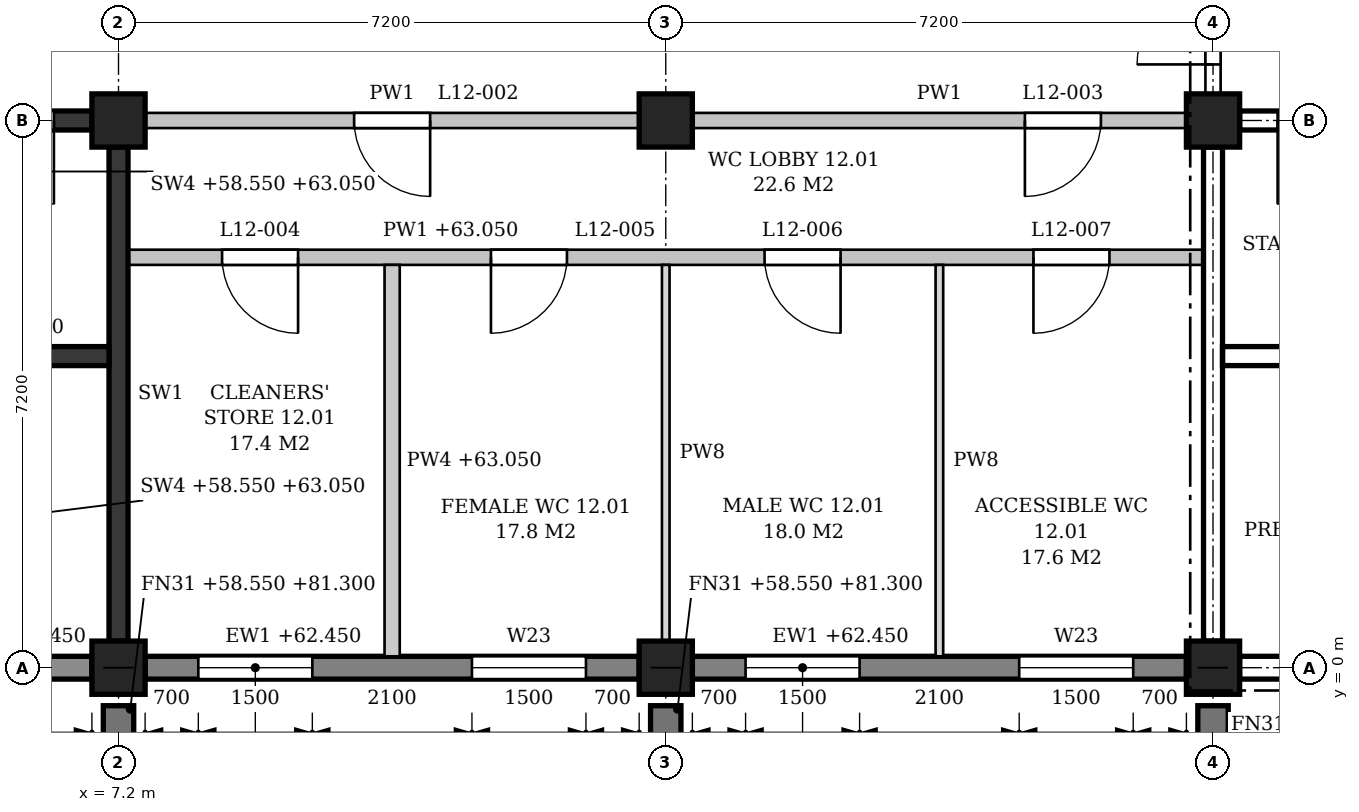
"""IFC4 building model, lengths in metres.
Left out: names, types, materials, properties, quantities, classifications, styles, units other than length and angle.
Written with IfcOpenShell. Run it as: python <this file> out.ifc"""

import sys

from ifc_helpers import new_model, si_unit, direction, frame, frame_2d, origin, origin_2d, place, context, subcontext, project, spatial, polyline, rectangle, outline, extrude, element, fill, save


model = new_model("IFC4")
c1 = context("Model", 3, precision=1e-05, world=origin(), true_north=direction((0.0, 1.0)))
c2 = subcontext(c1, "Body", "Model", "MODEL_VIEW")
j1 = project(units=[si_unit("LENGTHUNIT", "METRE"), si_unit("PLANEANGLEUNIT", "RADIAN")], contexts=[c1])
p1 = place(None, origin())
s1 = spatial("IfcSite", under=j1, at=p1, CompositionType="ELEMENT")
p2 = place(p1, origin())
s2 = spatial("IfcBuilding", under=s1, at=p2, CompositionType="ELEMENT")
p3 = place(p2, frame((0.0, 0.0, 58.8)))
s3 = spatial("IfcBuildingStorey", under=s2, at=p3, CompositionType="ELEMENT", Elevation=58.8)
for number, where, z_axis, x_axis in (
    (1, (7.2, 0.0, 0.0), (0.0, 0.0, 1.0), (1.0, 0.0, 0.0)),
    (2, (7.2, 7.2, 0.0), (0.0, 0.0, 1.0), (1.0, 0.0, 0.0)),
    (3, (14.4, 0.0, 0.0), (0.0, 0.0, 1.0), (1.0, 0.0, 0.0)),
    (4, (14.4, 7.2, 0.0), (0.0, 0.0, 1.0), (1.0, 0.0, 0.0)),
    (5, (21.6, 0.0, 0.0), (0.0, 0.0, 1.0), (1.0, 0.0, 0.0)),
    (6, (21.6, 7.2, 0.0), (0.0, 0.0, 1.0), (1.0, 0.0, 0.0)),
):
    element("IfcColumn", number, at=place(p3, frame(where, z_axis=z_axis, x_axis=x_axis)), inside=s3, PredefinedType="COLUMN", context=c2, shape_type="SweptSolid", body=[
        extrude(rectangle(XDim=0.7, YDim=0.7, at=origin_2d()), origin(), (0.0, 0.0, 1.0), 4.5),
    ])
p4 = place(p3, frame((0.35, 0.0, 0.0), z_axis=(0.0, 0.0, 1.0), x_axis=(1.0, 0.0, 0.0)))
e7 = element("IfcWall", 7, at=p4, inside=s3, PredefinedType="STANDARD", context=c2, shape_type="SweptSolid", body=[
    extrude(rectangle(XDim=6.5, YDim=0.3, at=frame_2d((3.25, 0.0))), origin(), (0.0, 0.0, 1.0), 3.65),
])
p5 = place(p4, frame((1.0, 0.0, 0.9)))
e8 = element("IfcOpeningElement", 8, at=p5, cuts=e7, PredefinedType="OPENING", context=c2, shape_type="SweptSolid", body=[
    extrude(outline(polyline([(0.0, 0.0), (0.9, 0.0), (0.9, 2.25), (0.45, 2.7), (0.0, 2.25), (0.0, 0.0)])), frame((0.0, 0.16, 0.0), z_axis=(0.0, -1.0, 0.0), x_axis=(1.0, 0.0, 0.0)), (0.0, 0.0, 1.0), 0.32),
])
p6 = place(p3, frame((7.55, 0.0, 0.0), z_axis=(0.0, 0.0, 1.0), x_axis=(1.0, 0.0, 0.0)))
e9 = element("IfcWall", 9, at=p6, inside=s3, PredefinedType="STANDARD", context=c2, shape_type="SweptSolid", body=[
    extrude(rectangle(XDim=6.5, YDim=0.3, at=frame_2d((3.25, 0.0))), origin(), (0.0, 0.0, 1.0), 3.65),
])
p7 = place(p6, frame((0.7, 0.0, 0.9)))
e10 = element("IfcOpeningElement", 10, at=p7, cuts=e9, PredefinedType="OPENING", context=c2, shape_type="SweptSolid", body=[
    extrude(outline(polyline([(0.0, 0.0), (1.5, 0.0), (1.5, 1.95), (0.75, 2.7), (0.0, 1.95), (0.0, 0.0)])), frame((0.0, 0.16, 0.0), z_axis=(0.0, -1.0, 0.0), x_axis=(1.0, 0.0, 0.0)), (0.0, 0.0, 1.0), 0.32),
])
p8 = place(p6, frame((4.3, 0.0, 0.9)))
e11 = element("IfcOpeningElement", 11, at=p8, cuts=e9, PredefinedType="OPENING", context=c2, shape_type="SweptSolid", body=[
    extrude(outline(polyline([(0.0, 0.0), (1.5, 0.0), (1.5, 1.95), (0.75, 2.7), (0.0, 1.95), (0.0, 0.0)])), frame((0.0, 0.16, 0.0), z_axis=(0.0, -1.0, 0.0), x_axis=(1.0, 0.0, 0.0)), (0.0, 0.0, 1.0), 0.32),
])
p9 = place(p3, frame((14.75, 0.0, 0.0), z_axis=(0.0, 0.0, 1.0), x_axis=(1.0, 0.0, 0.0)))
e12 = element("IfcWall", 12, at=p9, inside=s3, PredefinedType="STANDARD", context=c2, shape_type="SweptSolid", body=[
    extrude(rectangle(XDim=6.5, YDim=0.3, at=frame_2d((3.25, 0.0))), origin(), (0.0, 0.0, 1.0), 3.65),
])
p10 = place(p9, frame((0.7, 0.0, 0.9)))
e13 = element("IfcOpeningElement", 13, at=p10, cuts=e12, PredefinedType="OPENING", context=c2, shape_type="SweptSolid", body=[
    extrude(outline(polyline([(0.0, 0.0), (1.5, 0.0), (1.5, 1.95), (0.75, 2.7), (0.0, 1.95), (0.0, 0.0)])), frame((0.0, 0.16, 0.0), z_axis=(0.0, -1.0, 0.0), x_axis=(1.0, 0.0, 0.0)), (0.0, 0.0, 1.0), 0.32),
])
p11 = place(p9, frame((4.3, 0.0, 0.9)))
e14 = element("IfcOpeningElement", 14, at=p11, cuts=e12, PredefinedType="OPENING", context=c2, shape_type="SweptSolid", body=[
    extrude(outline(polyline([(0.0, 0.0), (1.5, 0.0), (1.5, 1.95), (0.75, 2.7), (0.0, 1.95), (0.0, 0.0)])), frame((0.0, 0.16, 0.0), z_axis=(0.0, -1.0, 0.0), x_axis=(1.0, 0.0, 0.0)), (0.0, 0.0, 1.0), 0.32),
])
p12 = place(p3, frame((21.95, 0.0, 0.0), z_axis=(0.0, 0.0, 1.0), x_axis=(1.0, 0.0, 0.0)))
e15 = element("IfcWall", 15, at=p12, inside=s3, PredefinedType="STANDARD", context=c2, shape_type="SweptSolid", body=[
    extrude(rectangle(XDim=6.5, YDim=0.3, at=frame_2d((3.25, 0.0))), origin(), (0.0, 0.0, 1.0), 3.65),
])
p13 = place(p12, frame((4.6, 0.0, 0.9)))
e16 = element("IfcOpeningElement", 16, at=p13, cuts=e15, PredefinedType="OPENING", context=c2, shape_type="SweptSolid", body=[
    extrude(outline(polyline([(0.0, 0.0), (0.9, 0.0), (0.9, 2.25), (0.45, 2.7), (0.0, 2.25), (0.0, 0.0)])), frame((0.0, 0.16, 0.0), z_axis=(0.0, -1.0, 0.0), x_axis=(1.0, 0.0, 0.0)), (0.0, 0.0, 1.0), 0.32),
])
for number, where, z_axis, x_axis in (
    (17, (7.2, -0.5, -0.25), (0.0, 0.0, 1.0), (0.0, -1.0, 0.0)),
    (18, (14.4, -0.5, -0.25), (0.0, 0.0, 1.0), (0.0, -1.0, 0.0)),
    (19, (21.6, -0.5, -0.25), (0.0, 0.0, 1.0), (0.0, -1.0, 0.0)),
):
    element("IfcWall", number, at=place(p3, frame(where, z_axis=z_axis, x_axis=x_axis)), inside=s3, PredefinedType="POLYGONAL", context=c2, shape_type="SweptSolid", body=[
        extrude(outline(polyline([(0.5, 0.0), (0.5, 22.225), (0.15, 22.75), (0.0, 22.75), (0.0, 0.0), (0.5, 0.0)])), frame((0.0, 0.2, 0.0), z_axis=(0.0, -1.0, 0.0), x_axis=(1.0, 0.0, 0.0)), (0.0, 0.0, 1.0), 0.4),
    ])
p14 = place(p3, frame((0.35, 7.2, 0.0), z_axis=(0.0, 0.0, 1.0), x_axis=(1.0, 0.0, 0.0)))
e20 = element("IfcWall", 20, at=p14, inside=s3, PredefinedType="SHEAR", context=c2, shape_type="SweptSolid", body=[
    extrude(rectangle(XDim=6.5, YDim=0.25, at=frame_2d((3.25, 0.0))), origin(), (0.0, 0.0, 1.0), 3.6),
])
p15 = place(p14, frame((4.9, 0.0, 0.0)))
e21 = element("IfcOpeningElement", 21, at=p15, cuts=e20, PredefinedType="OPENING", context=c2, shape_type="SweptSolid", body=[
    extrude(rectangle(XDim=1.1, YDim=2.1, at=frame_2d((0.55, 1.05))), frame((0.0, 0.135, 0.0), z_axis=(0.0, -1.0, 0.0), x_axis=(1.0, 0.0, 0.0)), (0.0, 0.0, 1.0), 0.27),
])
p16 = place(p3, frame((7.2, 0.35, 0.0), z_axis=(0.0, 0.0, 1.0), x_axis=(0.0, 1.0, 0.0)))
e22 = element("IfcWall", 22, at=p16, inside=s3, PredefinedType="SHEAR", context=c2, shape_type="SweptSolid", body=[
    extrude(rectangle(XDim=6.5, YDim=0.25, at=frame_2d((3.25, 0.0))), origin(), (0.0, 0.0, 1.0), 3.6),
])
p17 = place(p3, frame((4.1, 4.1, 0.0), z_axis=(0.0, 0.0, 1.0), x_axis=(1.0, 0.0, 0.0)))
e23 = element("IfcWall", 23, at=p17, inside=s3, PredefinedType="SHEAR", context=c2, shape_type="SweptSolid", body=[
    extrude(rectangle(XDim=2.975, YDim=0.25, at=frame_2d((1.487, 0.0))), origin(), (0.0, 0.0, 1.0), 4.25),
])
p18 = place(p17, frame((0.55, 0.0, 0.0)))
e24 = element("IfcOpeningElement", 24, at=p18, cuts=e23, PredefinedType="OPENING", context=c2, shape_type="SweptSolid", body=[
    extrude(rectangle(XDim=0.9, YDim=2.1, at=frame_2d((0.45, 1.05))), frame((0.0, 0.135, 0.0), z_axis=(0.0, -1.0, 0.0), x_axis=(1.0, 0.0, 0.0)), (0.0, 0.0, 1.0), 0.27),
])
p19 = place(p3, frame((21.95, 7.2, 0.0), z_axis=(0.0, 0.0, 1.0), x_axis=(1.0, 0.0, 0.0)))
e25 = element("IfcWall", 25, at=p19, inside=s3, PredefinedType="SHEAR", context=c2, shape_type="SweptSolid", body=[
    extrude(rectangle(XDim=6.5, YDim=0.25, at=frame_2d((3.25, 0.0))), origin(), (0.0, 0.0, 1.0), 3.6),
])
p20 = place(p19, frame((0.5, 0.0, 0.0)))
e26 = element("IfcOpeningElement", 26, at=p20, cuts=e25, PredefinedType="OPENING", context=c2, shape_type="SweptSolid", body=[
    extrude(rectangle(XDim=1.1, YDim=2.1, at=frame_2d((0.55, 1.05))), frame((0.0, 0.135, 0.0), z_axis=(0.0, -1.0, 0.0), x_axis=(1.0, 0.0, 0.0)), (0.0, 0.0, 1.0), 0.27),
])
p21 = place(p3, frame((21.6, 0.35, 0.0), z_axis=(0.0, 0.0, 1.0), x_axis=(0.0, 1.0, 0.0)))
e27 = element("IfcWall", 27, at=p21, inside=s3, PredefinedType="SHEAR", context=c2, shape_type="SweptSolid", body=[
    extrude(rectangle(XDim=6.5, YDim=0.25, at=frame_2d((3.25, 0.0))), origin(), (0.0, 0.0, 1.0), 3.6),
])
p22 = place(p3, frame((21.725, 4.1, 0.0), z_axis=(0.0, 0.0, 1.0), x_axis=(1.0, 0.0, 0.0)))
e28 = element("IfcWall", 28, at=p22, inside=s3, PredefinedType="SHEAR", context=c2, shape_type="SweptSolid", body=[
    extrude(rectangle(XDim=2.975, YDim=0.25, at=frame_2d((1.487, 0.0))), origin(), (0.0, 0.0, 1.0), 4.25),
])
p23 = place(p22, frame((1.525, 0.0, 0.0)))
e29 = element("IfcOpeningElement", 29, at=p23, cuts=e28, PredefinedType="OPENING", context=c2, shape_type="SweptSolid", body=[
    extrude(rectangle(XDim=0.9, YDim=2.1, at=frame_2d((0.45, 1.05))), frame((0.0, 0.135, 0.0), z_axis=(0.0, -1.0, 0.0), x_axis=(1.0, 0.0, 0.0)), (0.0, 0.0, 1.0), 0.27),
])
p24 = place(p3, frame((7.325, 5.4, 0.0), z_axis=(0.0, 0.0, 1.0), x_axis=(1.0, 0.0, 0.0)))
e30 = element("IfcWall", 30, at=p24, inside=s3, PredefinedType="PARTITIONING", context=c2, shape_type="SweptSolid", body=[
    extrude(outline(polyline([(0.0, 0.0), (14.15, 0.0), (14.15, 3.6), (14.075, 3.6), (14.075, 4.25), (7.275, 4.25), (7.275, 3.6), (6.875, 3.6), (6.875, 4.25), (0.075, 4.25), (0.075, 3.6), (0.0, 3.6), (0.0, 0.0)])), frame((0.0, 0.1, 0.0), z_axis=(0.0, -1.0, 0.0), x_axis=(1.0, 0.0, 0.0)), (0.0, 0.0, 1.0), 0.2),
])
p25 = place(p24, frame((1.238, 0.0, 0.0)))
e31 = element("IfcOpeningElement", 31, at=p25, cuts=e30, PredefinedType="OPENING", context=c2, shape_type="SweptSolid", body=[
    extrude(rectangle(XDim=1.0, YDim=2.1, at=frame_2d((0.5, 1.05))), frame((0.0, 0.11, 0.0), z_axis=(0.0, -1.0, 0.0), x_axis=(1.0, 0.0, 0.0)), (0.0, 0.0, 1.0), 0.22),
])
p26 = place(p24, frame((4.775, 0.0, 0.0)))
e32 = element("IfcOpeningElement", 32, at=p26, cuts=e30, PredefinedType="OPENING", context=c2, shape_type="SweptSolid", body=[
    extrude(rectangle(XDim=1.0, YDim=2.1, at=frame_2d((0.5, 1.05))), frame((0.0, 0.11, 0.0), z_axis=(0.0, -1.0, 0.0), x_axis=(1.0, 0.0, 0.0)), (0.0, 0.0, 1.0), 0.22),
])
p27 = place(p24, frame((8.375, 0.0, 0.0)))
e33 = element("IfcOpeningElement", 33, at=p27, cuts=e30, PredefinedType="OPENING", context=c2, shape_type="SweptSolid", body=[
    extrude(rectangle(XDim=1.0, YDim=2.1, at=frame_2d((0.5, 1.05))), frame((0.0, 0.11, 0.0), z_axis=(0.0, -1.0, 0.0), x_axis=(1.0, 0.0, 0.0)), (0.0, 0.0, 1.0), 0.22),
])
p28 = place(p24, frame((11.913, 0.0, 0.0)))
e34 = element("IfcOpeningElement", 34, at=p28, cuts=e30, PredefinedType="OPENING", context=c2, shape_type="SweptSolid", body=[
    extrude(rectangle(XDim=1.0, YDim=2.1, at=frame_2d((0.5, 1.05))), frame((0.0, 0.11, 0.0), z_axis=(0.0, -1.0, 0.0), x_axis=(1.0, 0.0, 0.0)), (0.0, 0.0, 1.0), 0.22),
])
p29 = place(p3, frame((7.55, 7.2, 0.0), z_axis=(0.0, 0.0, 1.0), x_axis=(1.0, 0.0, 0.0)))
e35 = element("IfcWall", 35, at=p29, inside=s3, PredefinedType="PARTITIONING", context=c2, shape_type="SweptSolid", body=[
    extrude(rectangle(XDim=6.5, YDim=0.2, at=frame_2d((3.25, 0.0))), origin(), (0.0, 0.0, 1.0), 3.6),
])
p30 = place(p29, frame((2.75, 0.0, 0.0)))
e36 = element("IfcOpeningElement", 36, at=p30, cuts=e35, PredefinedType="OPENING", context=c2, shape_type="SweptSolid", body=[
    extrude(rectangle(XDim=1.0, YDim=2.1, at=frame_2d((0.5, 1.05))), frame((0.0, 0.11, 0.0), z_axis=(0.0, -1.0, 0.0), x_axis=(1.0, 0.0, 0.0)), (0.0, 0.0, 1.0), 0.22),
])
p31 = place(p3, frame((14.75, 7.2, 0.0), z_axis=(0.0, 0.0, 1.0), x_axis=(1.0, 0.0, 0.0)))
e37 = element("IfcWall", 37, at=p31, inside=s3, PredefinedType="PARTITIONING", context=c2, shape_type="SweptSolid", body=[
    extrude(rectangle(XDim=6.5, YDim=0.2, at=frame_2d((3.25, 0.0))), origin(), (0.0, 0.0, 1.0), 3.6),
])
p32 = place(p31, frame((4.375, 0.0, 0.0)))
e38 = element("IfcOpeningElement", 38, at=p32, cuts=e37, PredefinedType="OPENING", context=c2, shape_type="SweptSolid", body=[
    extrude(rectangle(XDim=1.0, YDim=2.1, at=frame_2d((0.5, 1.05))), frame((0.0, 0.11, 0.0), z_axis=(0.0, -1.0, 0.0), x_axis=(1.0, 0.0, 0.0)), (0.0, 0.0, 1.0), 0.22),
])
p33 = place(p3, frame((10.8, 0.15, 0.0), z_axis=(0.0, 0.0, 1.0), x_axis=(0.0, 1.0, 0.0)))
e39 = element("IfcWall", 39, at=p33, inside=s3, PredefinedType="PARTITIONING", context=c2, shape_type="SweptSolid", body=[
    extrude(outline(polyline([(0.0, 0.0), (5.15, 0.0), (5.15, 4.25), (0.05, 4.25), (0.05, 3.65), (0.0, 3.65), (0.0, 0.0)])), frame((0.0, 0.1, 0.0), z_axis=(0.0, -1.0, 0.0), x_axis=(1.0, 0.0, 0.0)), (0.0, 0.0, 1.0), 0.2),
])
p34 = place(p3, frame((14.4, 0.35, 0.0), z_axis=(0.0, 0.0, 1.0), x_axis=(0.0, 1.0, 0.0)))
e40 = element("IfcWall", 40, at=p34, inside=s3, PredefinedType="PARTITIONING", context=c2, shape_type="SweptSolid", body=[
    extrude(rectangle(XDim=4.95, YDim=0.1, at=frame_2d((2.475, 0.0))), origin(), (0.0, 0.0, 1.0), 3.6),
])
p35 = place(p3, frame((18.0, 0.15, 0.0), z_axis=(0.0, 0.0, 1.0), x_axis=(0.0, 1.0, 0.0)))
e41 = element("IfcWall", 41, at=p35, inside=s3, PredefinedType="PARTITIONING", context=c2, shape_type="SweptSolid", body=[
    extrude(rectangle(XDim=5.15, YDim=0.1, at=frame_2d((2.575, 0.0))), origin(), (0.0, 0.0, 1.0), 3.6),
])
p36 = place(p3, frame((21.6, 7.55, 0.0), z_axis=(0.0, 0.0, 1.0), x_axis=(0.0, 1.0, 0.0)))
e42 = element("IfcWall", 42, at=p36, inside=s3, PredefinedType="PARTITIONING", context=c2, shape_type="SweptSolid", body=[
    extrude(rectangle(XDim=2.775, YDim=0.2, at=frame_2d((1.387, 0.0))), origin(), (0.0, 0.0, 1.0), 3.6),
])
p37 = place(p36, frame((0.387, 0.0, 0.0)))
e43 = element("IfcOpeningElement", 43, at=p37, cuts=e42, PredefinedType="OPENING", context=c2, shape_type="SweptSolid", body=[
    extrude(rectangle(XDim=2.0, YDim=2.4, at=frame_2d((1.0, 1.2))), frame((0.0, 0.11, 0.0), z_axis=(0.0, -1.0, 0.0), x_axis=(1.0, 0.0, 0.0)), (0.0, 0.0, 1.0), 0.22),
])
p38 = place(p7, origin())
e44 = element("IfcWindow", 44, at=p38, inside=s3, PartitioningType="SINGLE_PANEL", PredefinedType="WINDOW", context=c2, shape_type="SweptSolid", body=[
    extrude(outline(polyline([(0.0, 0.0), (1.5, 0.0), (1.5, 1.95), (0.75, 2.7), (0.0, 1.95), (0.0, 0.0)])), frame((0.0, 0.03, 0.0), z_axis=(0.0, -1.0, 0.0), x_axis=(1.0, 0.0, 0.0)), (0.0, 0.0, 1.0), 0.06),
])
fill(e10, e44)
p39 = place(p8, origin())
e45 = element("IfcWindow", 45, at=p39, inside=s3, PartitioningType="SINGLE_PANEL", PredefinedType="WINDOW", context=c2, shape_type="SweptSolid", body=[
    extrude(outline(polyline([(0.0, 0.0), (1.5, 0.0), (1.5, 1.95), (0.75, 2.7), (0.0, 1.95), (0.0, 0.0)])), frame((0.0, 0.03, 0.0), z_axis=(0.0, -1.0, 0.0), x_axis=(1.0, 0.0, 0.0)), (0.0, 0.0, 1.0), 0.06),
])
fill(e11, e45)
p40 = place(p10, origin())
e46 = element("IfcWindow", 46, at=p40, inside=s3, PartitioningType="SINGLE_PANEL", PredefinedType="WINDOW", context=c2, shape_type="SweptSolid", body=[
    extrude(outline(polyline([(0.0, 0.0), (1.5, 0.0), (1.5, 1.95), (0.75, 2.7), (0.0, 1.95), (0.0, 0.0)])), frame((0.0, 0.03, 0.0), z_axis=(0.0, -1.0, 0.0), x_axis=(1.0, 0.0, 0.0)), (0.0, 0.0, 1.0), 0.06),
])
fill(e13, e46)
p41 = place(p11, origin())
e47 = element("IfcWindow", 47, at=p41, inside=s3, PartitioningType="SINGLE_PANEL", PredefinedType="WINDOW", context=c2, shape_type="SweptSolid", body=[
    extrude(outline(polyline([(0.0, 0.0), (1.5, 0.0), (1.5, 1.95), (0.75, 2.7), (0.0, 1.95), (0.0, 0.0)])), frame((0.0, 0.03, 0.0), z_axis=(0.0, -1.0, 0.0), x_axis=(1.0, 0.0, 0.0)), (0.0, 0.0, 1.0), 0.06),
])
fill(e14, e47)
p42 = place(p15, frame((1.1, 0.0, 0.0), z_axis=(0.0, 0.0, 1.0), x_axis=(-1.0, 0.0, 0.0)))
e48 = element("IfcDoor", 48, at=p42, inside=s3, OperationType="SINGLE_SWING_LEFT", PredefinedType="DOOR", context=c2, shape_type="SweptSolid", body=[
    extrude(rectangle(XDim=1.1, YDim=2.1, at=frame_2d((0.55, 1.05))), frame((0.0, 0.025, 0.0), z_axis=(0.0, -1.0, 0.0), x_axis=(1.0, 0.0, 0.0)), (0.0, 0.0, 1.0), 0.05),
])
fill(e21, e48)
p43 = place(p20, frame((1.1, 0.0, 0.0), z_axis=(0.0, 0.0, 1.0), x_axis=(-1.0, 0.0, 0.0)))
e49 = element("IfcDoor", 49, at=p43, inside=s3, OperationType="SINGLE_SWING_RIGHT", PredefinedType="DOOR", context=c2, shape_type="SweptSolid", body=[
    extrude(rectangle(XDim=1.1, YDim=2.1, at=frame_2d((0.55, 1.05))), frame((0.0, 0.025, 0.0), z_axis=(0.0, -1.0, 0.0), x_axis=(1.0, 0.0, 0.0)), (0.0, 0.0, 1.0), 0.05),
])
fill(e26, e49)
p44 = place(p37, origin())
e50 = element("IfcDoor", 50, at=p44, inside=s3, OperationType="DOUBLE_DOOR_SINGLE_SWING", PredefinedType="DOOR", context=c2, shape_type="SweptSolid", body=[
    extrude(rectangle(XDim=2.0, YDim=2.4, at=frame_2d((1.0, 1.2))), frame((0.0, 0.025, 0.0), z_axis=(0.0, -1.0, 0.0), x_axis=(1.0, 0.0, 0.0)), (0.0, 0.0, 1.0), 0.05),
])
fill(e43, e50)
p45 = place(p30, frame((1.0, 0.0, 0.0), z_axis=(0.0, 0.0, 1.0), x_axis=(-1.0, 0.0, 0.0)))
e51 = element("IfcDoor", 51, at=p45, inside=s3, OperationType="SINGLE_SWING_LEFT", PredefinedType="DOOR", context=c2, shape_type="SweptSolid", body=[
    extrude(rectangle(XDim=1.0, YDim=2.1, at=frame_2d((0.5, 1.05))), frame((0.0, 0.025, 0.0), z_axis=(0.0, -1.0, 0.0), x_axis=(1.0, 0.0, 0.0)), (0.0, 0.0, 1.0), 0.05),
])
fill(e36, e51)
p46 = place(p32, frame((1.0, 0.0, 0.0), z_axis=(0.0, 0.0, 1.0), x_axis=(-1.0, 0.0, 0.0)))
e52 = element("IfcDoor", 52, at=p46, inside=s3, OperationType="SINGLE_SWING_RIGHT", PredefinedType="DOOR", context=c2, shape_type="SweptSolid", body=[
    extrude(rectangle(XDim=1.0, YDim=2.1, at=frame_2d((0.5, 1.05))), frame((0.0, 0.025, 0.0), z_axis=(0.0, -1.0, 0.0), x_axis=(1.0, 0.0, 0.0)), (0.0, 0.0, 1.0), 0.05),
])
fill(e38, e52)
p47 = place(p25, frame((1.0, 0.0, 0.0), z_axis=(0.0, 0.0, 1.0), x_axis=(-1.0, 0.0, 0.0)))
e53 = element("IfcDoor", 53, at=p47, inside=s3, OperationType="SINGLE_SWING_LEFT", PredefinedType="DOOR", context=c2, shape_type="SweptSolid", body=[
    extrude(rectangle(XDim=1.0, YDim=2.1, at=frame_2d((0.5, 1.05))), frame((0.0, 0.025, 0.0), z_axis=(0.0, -1.0, 0.0), x_axis=(1.0, 0.0, 0.0)), (0.0, 0.0, 1.0), 0.05),
])
fill(e31, e53)
p48 = place(p26, frame((1.0, 0.0, 0.0), z_axis=(0.0, 0.0, 1.0), x_axis=(-1.0, 0.0, 0.0)))
e54 = element("IfcDoor", 54, at=p48, inside=s3, OperationType="SINGLE_SWING_RIGHT", PredefinedType="DOOR", context=c2, shape_type="SweptSolid", body=[
    extrude(rectangle(XDim=1.0, YDim=2.1, at=frame_2d((0.5, 1.05))), frame((0.0, 0.025, 0.0), z_axis=(0.0, -1.0, 0.0), x_axis=(1.0, 0.0, 0.0)), (0.0, 0.0, 1.0), 0.05),
])
fill(e32, e54)
p49 = place(p27, frame((1.0, 0.0, 0.0), z_axis=(0.0, 0.0, 1.0), x_axis=(-1.0, 0.0, 0.0)))
e55 = element("IfcDoor", 55, at=p49, inside=s3, OperationType="SINGLE_SWING_LEFT", PredefinedType="DOOR", context=c2, shape_type="SweptSolid", body=[
    extrude(rectangle(XDim=1.0, YDim=2.1, at=frame_2d((0.5, 1.05))), frame((0.0, 0.025, 0.0), z_axis=(0.0, -1.0, 0.0), x_axis=(1.0, 0.0, 0.0)), (0.0, 0.0, 1.0), 0.05),
])
fill(e33, e55)
p50 = place(p28, frame((1.0, 0.0, 0.0), z_axis=(0.0, 0.0, 1.0), x_axis=(-1.0, 0.0, 0.0)))
e56 = element("IfcDoor", 56, at=p50, inside=s3, OperationType="SINGLE_SWING_RIGHT", PredefinedType="DOOR", context=c2, shape_type="SweptSolid", body=[
    extrude(rectangle(XDim=1.0, YDim=2.1, at=frame_2d((0.5, 1.05))), frame((0.0, 0.025, 0.0), z_axis=(0.0, -1.0, 0.0), x_axis=(1.0, 0.0, 0.0)), (0.0, 0.0, 1.0), 0.05),
])
fill(e34, e56)
save(model, sys.argv[1])
